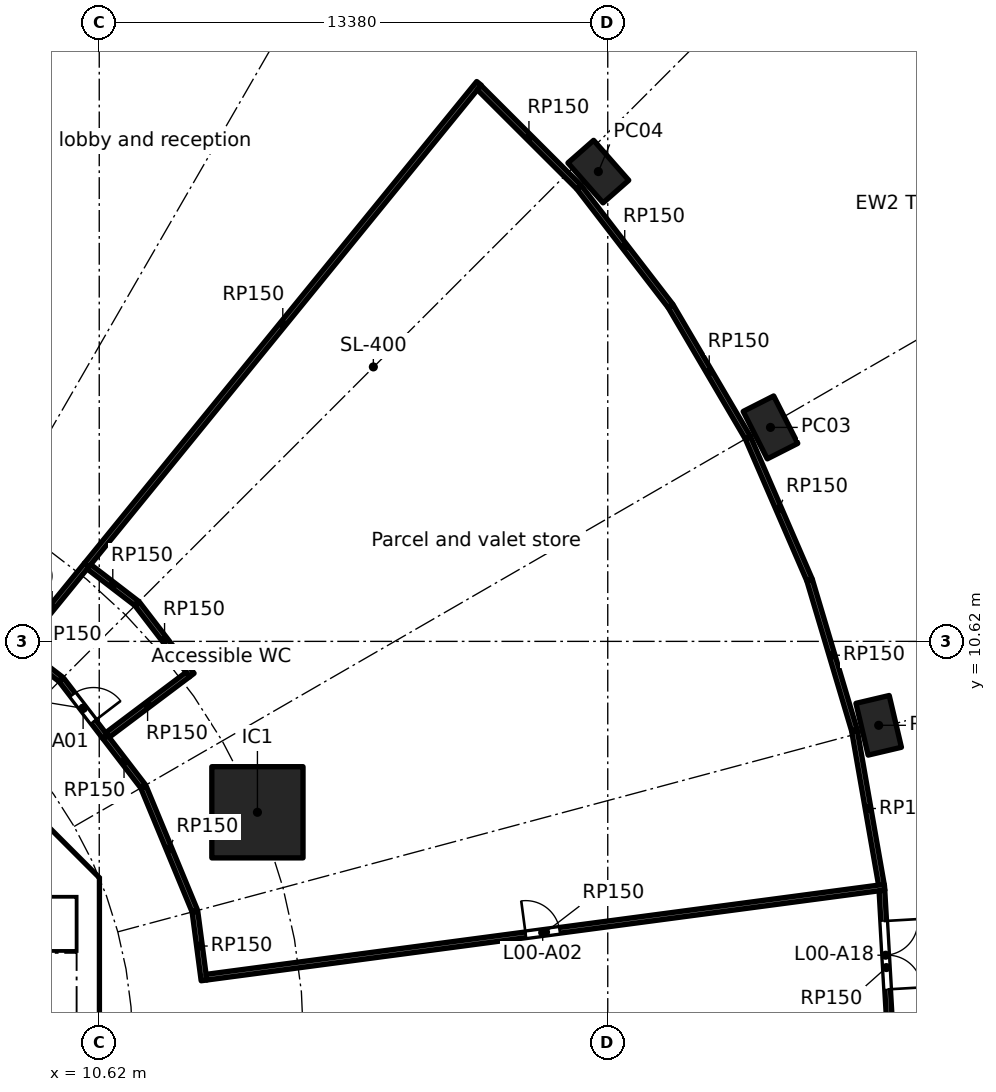
"""IFC4 building model, lengths in metres.
Left out: names, types, materials, properties, quantities, classifications, styles, units other than length and angle.
Written with IfcOpenShell. Run it as: python <this file> out.ifc"""

import sys

from ifc_helpers import new_model, si_unit, direction, frame, frame_2d, origin, origin_2d, place, context, subcontext, project, spatial, polyline, rectangle, hollow_rectangle, outline, extrude, element, fill, save


model = new_model("IFC4")
c1 = context("Model", 3, precision=1e-05, world=origin(), true_north=direction((0.0, 1.0)))
c2 = subcontext(c1, "Body", "Model", "MODEL_VIEW")
j1 = project(units=[si_unit("LENGTHUNIT", "METRE"), si_unit("PLANEANGLEUNIT", "RADIAN")], contexts=[c1])
p1 = place(None, origin())
s1 = spatial("IfcSite", under=j1, at=p1, CompositionType="ELEMENT")
p2 = place(p1, origin())
s2 = spatial("IfcBuilding", under=s1, at=p2, CompositionType="ELEMENT")
p3 = place(p2, origin())
s3 = spatial("IfcBuildingStorey", under=s2, at=p3, CompositionType="ELEMENT", Elevation=0.0)
for number, where, z_axis, x_axis in (
    (1, (31.129, 8.412, 0.0), (0.0, 0.0, 1.0), (-0.229, 0.973, 0.0)),
    (2, (28.282, 16.25, 0.0), (0.0, 0.0, 1.0), (-0.452, 0.892, 0.0)),
    (3, (23.752, 22.981, 0.0), (0.0, 0.0, 1.0), (-0.66, 0.751, 0.0)),
):
    element("IfcColumn", number, at=place(p3, frame(where, z_axis=z_axis, x_axis=x_axis)), inside=s3, PredefinedType="COLUMN", context=c2, shape_type="SweptSolid", body=[
        extrude(hollow_rectangle(XDim=1.4, YDim=0.9, WallThickness=0.05, at=origin_2d()), origin(), (0.0, 0.0, 1.0), 7.0),
    ])
p4 = place(p3, frame((14.782, 6.123, 0.0), z_axis=(0.0, 0.0, 1.0), x_axis=(1.0, 0.0, 0.0)))
e4 = element("IfcColumn", 4, at=p4, inside=s3, PredefinedType="COLUMN", context=c2, shape_type="SweptSolid", body=[
    extrude(rectangle(XDim=2.4, YDim=2.4, at=origin_2d()), origin(), (0.0, 0.0, 1.0), 7.0),
])
p5 = place(p3, frame((10.325, -3.801, 0.0), z_axis=(0.0, 0.0, 1.0), x_axis=(0.0, 1.0, 0.0)))
e5 = element("IfcWall", 5, at=p5, inside=s3, PredefinedType="SHEAR", context=c2, shape_type="SweptSolid", body=[
    extrude(rectangle(XDim=7.602, YDim=0.6, at=frame_2d((3.801, 0.0))), origin(), (0.0, 0.0, 1.0), 6.7),
])
p6 = place(p5, frame((6.351, 0.0, 0.0)))
e6 = element("IfcOpeningElement", 6, at=p6, cuts=e5, PredefinedType="OPENING", context=c2, shape_type="SweptSolid", body=[
    extrude(rectangle(XDim=1.1, YDim=2.1, at=frame_2d((0.55, 1.05))), frame((0.0, 0.31, 0.0), z_axis=(0.0, -1.0, 0.0), x_axis=(1.0, 0.0, 0.0)), (0.0, 0.0, 1.0), 0.62),
])
p7 = place(p3, frame((9.988, 4.613, 0.0), z_axis=(0.0, 0.0, 1.0), x_axis=(-0.707106781187, 0.707106781187, 0.0)))
e7 = element("IfcWall", 7, at=p7, inside=s3, PredefinedType="SHEAR", context=c2, shape_type="SweptSolid", body=[
    extrude(rectangle(XDim=7.602, YDim=0.6, at=frame_2d((3.801, 0.0))), origin(), (0.0, 0.0, 1.0), 6.7),
])
p8 = place(p7, frame((3.201, 0.0, 0.0)))
e8 = element("IfcOpeningElement", 8, at=p8, cuts=e7, PredefinedType="OPENING", context=c2, shape_type="SweptSolid", body=[
    extrude(rectangle(XDim=1.2, YDim=2.1, at=frame_2d((0.6, 1.05))), frame((0.0, 0.31, 0.0), z_axis=(0.0, -1.0, 0.0), x_axis=(1.0, 0.0, 0.0)), (0.0, 0.0, 1.0), 0.62),
])
p9 = place(p3, frame((6.7, 4.0, 0.0), z_axis=(0.0, 0.0, 1.0), x_axis=(1.0, 0.0, 0.0)))
e9 = element("IfcWall", 9, at=p9, inside=s3, PredefinedType="SOLIDWALL", context=c2, shape_type="SweptSolid", body=[
    extrude(rectangle(XDim=3.325, YDim=0.2, at=frame_2d((1.662, 0.0))), origin(), (0.0, 0.0, 1.0), 6.7),
])
p10 = place(p9, frame((1.25, 0.0, 0.0)))
e10 = element("IfcOpeningElement", 10, at=p10, cuts=e9, PredefinedType="OPENING", context=c2, shape_type="SweptSolid", body=[
    extrude(rectangle(XDim=1.1, YDim=2.1, at=frame_2d((0.55, 1.05))), frame((0.0, 0.11, 0.0), z_axis=(0.0, -1.0, 0.0), x_axis=(1.0, 0.0, 0.0)), (0.0, 0.0, 1.0), 0.22),
])
p11 = place(p3, origin())
e11 = element("IfcWall", 11, at=p11, inside=s3, PredefinedType="SHEAR", context=c2, shape_type="SweptSolid", body=[
    extrude(outline(polyline([(10.625, 3.801), (10.025, 3.801), (10.025, 4.152), (9.776, 4.401), (10.2, 4.825), (10.625, 4.401), (10.625, 3.801)])), origin(), (0.0, 0.0, 1.0), 6.7),
])
p12 = place(p3, frame((8.472, 10.401, 0.0), z_axis=(0.0, 0.0, 1.0), x_axis=(0.631544460315, 0.775339664048, 0.0)))
e12 = element("IfcWall", 12, at=p12, inside=s3, PredefinedType="PARTITIONING", context=c2, shape_type="SweptSolid", body=[
    extrude(rectangle(XDim=2.876, YDim=0.15, at=frame_2d((1.438, 0.0))), origin(), (0.0, 0.0, 1.0), 6.7),
])
p13 = place(p3, frame((9.607, 9.624, 0.0), z_axis=(0.0, 0.0, 1.0), x_axis=(-0.793421424222, 0.608672690028, 0.0)))
e13 = element("IfcWall", 13, at=p13, inside=s3, PredefinedType="PARTITIONING", context=c2, shape_type="SweptSolid", body=[
    extrude(rectangle(XDim=1.296, YDim=0.15, at=frame_2d((0.648, 0.0))), origin(), (0.0, 0.0, 1.0), 6.7),
])
p14 = place(p3, frame((10.348, 12.585, 0.0), z_axis=(0.0, 0.0, 1.0), x_axis=(0.793328373205, -0.608793965368, 0.0)))
e14 = element("IfcWall", 14, at=p14, inside=s3, PredefinedType="PARTITIONING", context=c2, shape_type="SweptSolid", body=[
    extrude(rectangle(XDim=1.584, YDim=0.15, at=frame_2d((0.792, 0.0))), origin(), (0.0, 0.0, 1.0), 6.7),
])
p15 = place(p3, frame((10.288, 12.631, 0.0), z_axis=(0.0, 0.0, 1.0), x_axis=(0.631545274273, 0.775339001046, 0.0)))
e15 = element("IfcWall", 15, at=p15, inside=s3, PredefinedType="PARTITIONING", context=c2, shape_type="SweptSolid", body=[
    extrude(rectangle(XDim=16.345, YDim=0.15, at=frame_2d((8.173, 0.0))), origin(), (0.0, 0.0, 1.0), 6.7),
])
p16 = place(p3, frame((10.774, 8.109, 0.0), z_axis=(0.0, 0.0, 1.0), x_axis=(-0.608754453805, 0.793358692504, 0.0)))
e16 = element("IfcWall", 16, at=p16, inside=s3, PredefinedType="PARTITIONING", context=c2, shape_type="SweptSolid", body=[
    extrude(rectangle(XDim=1.888, YDim=0.15, at=frame_2d((0.944, 0.0))), origin(), (0.0, 0.0, 1.0), 6.7),
])
p17 = place(p16, frame((0.5, 0.0, 0.0)))
e17 = element("IfcOpeningElement", 17, at=p17, cuts=e16, PredefinedType="OPENING", context=c2, shape_type="SweptSolid", body=[
    extrude(rectangle(XDim=0.9, YDim=2.1, at=frame_2d((0.45, 1.05))), frame((0.0, 0.085, 0.0), z_axis=(0.0, -1.0, 0.0), x_axis=(1.0, 0.0, 0.0)), (0.0, 0.0, 1.0), 0.17),
])
p18 = place(p3, frame((11.621, 11.604, 0.0), z_axis=(0.0, 0.0, 1.0), x_axis=(0.608759688573, -0.793354675771, 0.0)))
e18 = element("IfcWall", 18, at=p18, inside=s3, PredefinedType="PARTITIONING", context=c2, shape_type="SweptSolid", body=[
    extrude(rectangle(XDim=2.358, YDim=0.15, at=frame_2d((1.179, 0.0))), origin(), (0.0, 0.0, 1.0), 6.7),
])
p19 = place(p3, frame((11.771, 6.809, 0.0), z_axis=(0.0, 0.0, 1.0), x_axis=(-0.608716251771, 0.793388003961, 0.0)))
e19 = element("IfcWall", 19, at=p19, inside=s3, PredefinedType="PARTITIONING", context=c2, shape_type="SweptSolid", body=[
    extrude(rectangle(XDim=1.638, YDim=0.15, at=frame_2d((0.819, 0.0))), origin(), (0.0, 0.0, 1.0), 6.7),
])
p20 = place(p3, frame((12.951, 9.748, 0.0), z_axis=(0.0, 0.0, 1.0), x_axis=(-0.798970748419, -0.601369888813, 0.0)))
e20 = element("IfcWall", 20, at=p20, inside=s3, PredefinedType="PARTITIONING", context=c2, shape_type="SweptSolid", body=[
    extrude(rectangle(XDim=2.65, YDim=0.15, at=frame_2d((1.325, 0.0))), origin(), (0.0, 0.0, 1.0), 6.7),
])
p21 = place(p3, frame((13.132, 3.531, 0.0), z_axis=(0.0, 0.0, 1.0), x_axis=(-0.382677866108, 0.923881838111, 0.0)))
e21 = element("IfcWall", 21, at=p21, inside=s3, PredefinedType="PARTITIONING", context=c2, shape_type="SweptSolid", body=[
    extrude(rectangle(XDim=3.527, YDim=0.15, at=frame_2d((1.763, 0.0))), origin(), (0.0, 0.0, 1.0), 6.7),
])
p22 = place(p3, frame((13.376, 1.7, 0.0), z_axis=(0.0, 0.0, 1.0), x_axis=(-0.130506449818, 0.99144746031, 0.0)))
e22 = element("IfcWall", 22, at=p22, inside=s3, PredefinedType="PARTITIONING", context=c2, shape_type="SweptSolid", body=[
    extrude(rectangle(XDim=1.824, YDim=0.15, at=frame_2d((0.912, 0.0))), origin(), (0.0, 0.0, 1.0), 6.7),
])
p23 = place(p3, frame((20.617, 25.192, 0.0), z_axis=(0.0, 0.0, 1.0), x_axis=(0.707799198324, -0.706413685352, 0.0)))
e23 = element("IfcWall", 23, at=p23, inside=s3, PredefinedType="PARTITIONING", context=c2, shape_type="SweptSolid", body=[
    extrude(rectangle(XDim=3.7, YDim=0.15, at=frame_2d((1.85, 0.0))), origin(), (0.0, 0.0, 1.0), 6.7),
])
p24 = place(p3, frame((23.245, 22.568, 0.0), z_axis=(0.0, 0.0, 1.0), x_axis=(0.610426812106, -0.792072665266, 0.0)))
e24 = element("IfcWall", 24, at=p24, inside=s3, PredefinedType="PARTITIONING", context=c2, shape_type="SweptSolid", body=[
    extrude(rectangle(XDim=3.937, YDim=0.15, at=frame_2d((1.968, 0.0))), origin(), (0.0, 0.0, 1.0), 6.7),
])
p25 = place(p3, frame((25.656, 19.439, 0.0), z_axis=(0.0, 0.0, 1.0), x_axis=(0.50633554765, -0.86233654288, 0.0)))
e25 = element("IfcWall", 25, at=p25, inside=s3, PredefinedType="PARTITIONING", context=c2, shape_type="SweptSolid", body=[
    extrude(rectangle(XDim=4.006, YDim=0.15, at=frame_2d((2.003, 0.0))), origin(), (0.0, 0.0, 1.0), 6.7),
])
p26 = place(p3, frame((27.69, 15.972, 0.0), z_axis=(0.0, 0.0, 1.0), x_axis=(0.397639441132, -0.917541756465, 0.0)))
e26 = element("IfcWall", 26, at=p26, inside=s3, PredefinedType="PARTITIONING", context=c2, shape_type="SweptSolid", body=[
    extrude(rectangle(XDim=4.068, YDim=0.15, at=frame_2d((2.034, 0.0))), origin(), (0.0, 0.0, 1.0), 6.7),
])
p27 = place(p3, frame((29.312, 12.228, 0.0), z_axis=(0.0, 0.0, 1.0), x_axis=(0.285840471929, -0.958277216993, 0.0)))
e27 = element("IfcWall", 27, at=p27, inside=s3, PredefinedType="PARTITIONING", context=c2, shape_type="SweptSolid", body=[
    extrude(rectangle(XDim=4.117, YDim=0.15, at=frame_2d((2.059, 0.0))), origin(), (0.0, 0.0, 1.0), 6.7),
])
p28 = place(p3, frame((30.492, 8.271, 0.0), z_axis=(0.0, 0.0, 1.0), x_axis=(0.172163826112, -0.985068331122, 0.0)))
e28 = element("IfcWall", 28, at=p28, inside=s3, PredefinedType="PARTITIONING", context=c2, shape_type="SweptSolid", body=[
    extrude(rectangle(XDim=4.158, YDim=0.15, at=frame_2d((2.079, 0.0))), origin(), (0.0, 0.0, 1.0), 6.7),
])
p29 = place(p3, frame((31.284, 4.152, 0.0), z_axis=(0.0, 0.0, 1.0), x_axis=(-0.991305556345, -0.131579990725, 0.0)))
e29 = element("IfcWall", 29, at=p29, inside=s3, PredefinedType="PARTITIONING", context=c2, shape_type="SweptSolid", body=[
    extrude(rectangle(XDim=18.0, YDim=0.15, at=frame_2d((9.0, 0.0))), origin(), (0.0, 0.0, 1.0), 6.7),
])
p30 = place(p29, frame((8.625, 0.0, 0.0)))
e30 = element("IfcOpeningElement", 30, at=p30, cuts=e29, PredefinedType="OPENING", context=c2, shape_type="SweptSolid", body=[
    extrude(rectangle(XDim=0.9, YDim=2.1, at=frame_2d((0.45, 1.05))), frame((0.0, 0.085, 0.0), z_axis=(0.0, -1.0, 0.0), x_axis=(1.0, 0.0, 0.0)), (0.0, 0.0, 1.0), 0.17),
])
p31 = place(p3, frame((31.448, 0.006, 0.0), z_axis=(0.0, 0.0, 1.0), x_axis=(-0.057497602941, 0.998345644382, 0.0)))
e31 = element("IfcWall", 31, at=p31, inside=s3, PredefinedType="PARTITIONING", context=c2, shape_type="SweptSolid", body=[
    extrude(rectangle(XDim=4.068, YDim=0.15, at=frame_2d((2.034, 0.0))), origin(), (0.0, 0.0, 1.0), 6.7),
])
p32 = place(p31, frame((1.46, 0.0, 0.0)))
e32 = element("IfcOpeningElement", 32, at=p32, cuts=e31, PredefinedType="OPENING", context=c2, shape_type="SweptSolid", body=[
    extrude(rectangle(XDim=1.8, YDim=2.1, at=frame_2d((0.9, 1.05))), frame((0.0, 0.085, 0.0), z_axis=(0.0, -1.0, 0.0), x_axis=(1.0, 0.0, 0.0)), (0.0, 0.0, 1.0), 0.17),
])
p33 = place(p6, frame((1.1, 0.0, 0.0), x_axis=(-1.0, 0.0, 0.0)))
e33 = element("IfcDoor", 33, at=p33, inside=s3, OperationType="SINGLE_SWING_LEFT", PredefinedType="DOOR", context=c2, shape_type="SweptSolid", body=[
    extrude(rectangle(XDim=1.1, YDim=2.1, at=frame_2d((0.55, 1.05))), frame((0.0, 0.025, 0.0), z_axis=(0.0, -1.0, 0.0), x_axis=(1.0, 0.0, 0.0)), (0.0, 0.0, 1.0), 0.05),
])
fill(e6, e33)
p34 = place(p17, frame((0.9, 0.0, 0.0), x_axis=(-1.0, 0.0, 0.0)))
e34 = element("IfcDoor", 34, at=p34, inside=s3, OperationType="SINGLE_SWING_RIGHT", PredefinedType="DOOR", context=c2, shape_type="SweptSolid", body=[
    extrude(rectangle(XDim=0.9, YDim=2.1, at=frame_2d((0.45, 1.05))), frame((0.0, 0.025, 0.0), z_axis=(0.0, -1.0, 0.0), x_axis=(1.0, 0.0, 0.0)), (0.0, 0.0, 1.0), 0.05),
])
fill(e17, e34)
p35 = place(p30, frame((0.9, 0.0, 0.0), x_axis=(-1.0, 0.0, 0.0)))
e35 = element("IfcDoor", 35, at=p35, inside=s3, OperationType="SINGLE_SWING_LEFT", PredefinedType="DOOR", context=c2, shape_type="SweptSolid", body=[
    extrude(rectangle(XDim=0.9, YDim=2.1, at=frame_2d((0.45, 1.05))), frame((0.0, 0.025, 0.0), z_axis=(0.0, -1.0, 0.0), x_axis=(1.0, 0.0, 0.0)), (0.0, 0.0, 1.0), 0.05),
])
fill(e30, e35)
p36 = place(p32, frame((1.8, 0.0, 0.0), x_axis=(-1.0, 0.0, 0.0)))
e36 = element("IfcDoor", 36, at=p36, inside=s3, OperationType="DOUBLE_DOOR_SINGLE_SWING", PredefinedType="DOOR", context=c2, shape_type="SweptSolid", body=[
    extrude(rectangle(XDim=1.8, YDim=2.1, at=frame_2d((0.9, 1.05))), frame((0.0, 0.025, 0.0), z_axis=(0.0, -1.0, 0.0), x_axis=(1.0, 0.0, 0.0)), (0.0, 0.0, 1.0), 0.05),
])
fill(e32, e36)
save(model, sys.argv[1])
